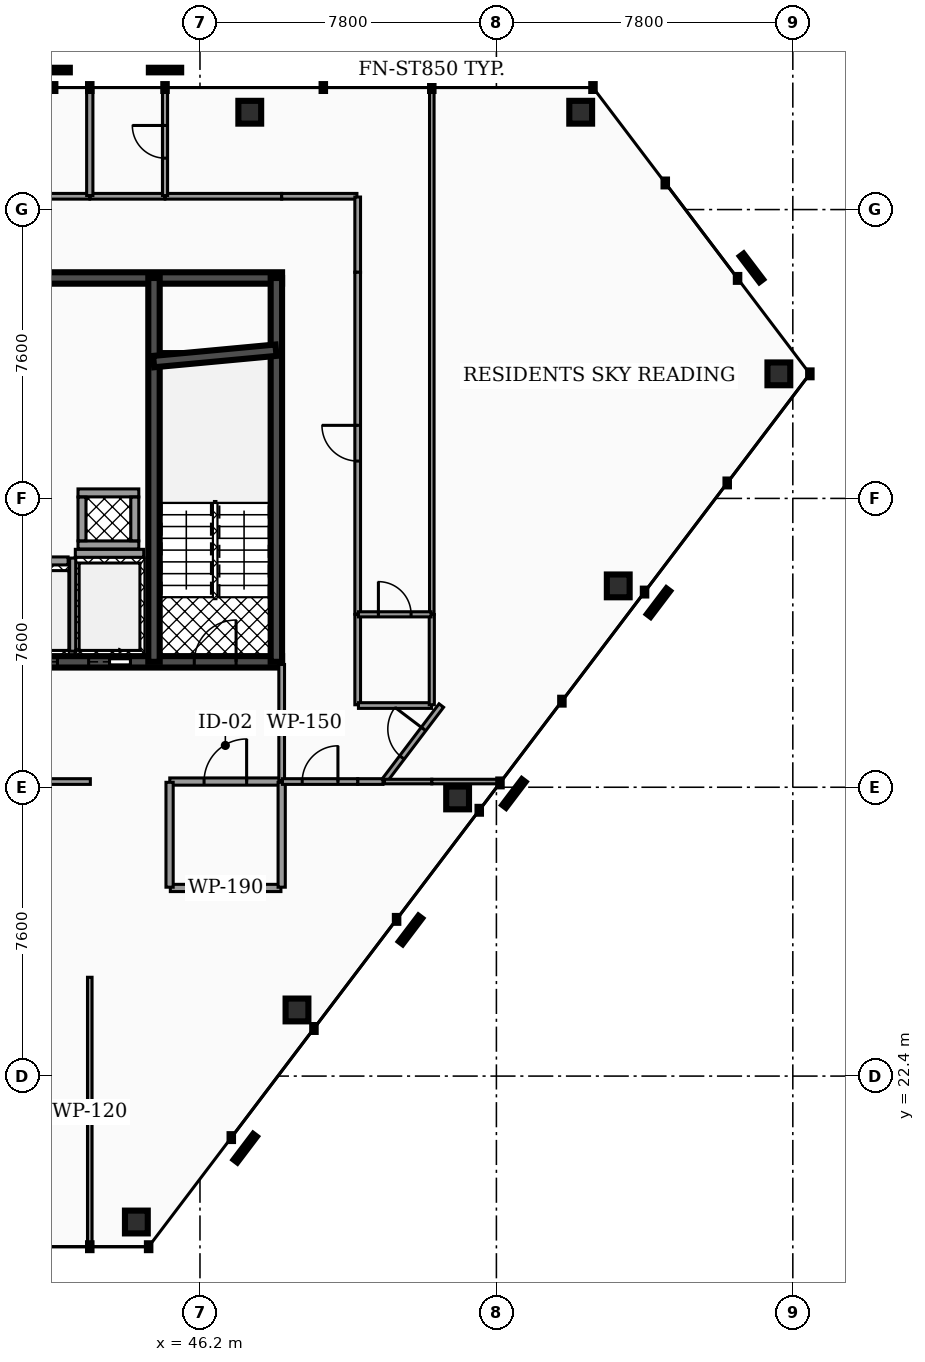
"""IFC4 building model, lengths in metres.
Left out: names, types, materials, properties, quantities, classifications, styles, units other than length and angle.
Written with IfcOpenShell. Run it as: python <this file> out.ifc"""

import sys

from ifc_helpers import new_model, si_unit, direction, frame, frame_2d, origin, origin_2d, place, context, subcontext, project, spatial, rectangle, hollow_rectangle, extrude, element, fill, save


model = new_model("IFC4")
c1 = context("Model", 3, precision=1e-05, world=origin(), true_north=direction((0.0, 1.0)))
c2 = subcontext(c1, "Body", "Model", "MODEL_VIEW")
j1 = project(units=[si_unit("LENGTHUNIT", "METRE"), si_unit("PLANEANGLEUNIT", "RADIAN")], contexts=[c1])
p1 = place(None, origin())
s1 = spatial("IfcSite", under=j1, at=p1, CompositionType="ELEMENT")
p2 = place(p1, origin())
s2 = spatial("IfcBuilding", under=s1, at=p2, CompositionType="ELEMENT")
p3 = place(p2, frame((0.0, 0.0, 208.76)))
s3 = spatial("IfcBuildingStorey", under=s2, at=p3, CompositionType="ELEMENT", Elevation=208.76)
p4 = place(p3, frame((28.5, 43.4, 0.0), z_axis=(0.0, 0.0, 1.0), x_axis=(1.0, 0.0, 0.0)))
e1 = element("IfcWall", 1, at=p4, inside=s3, PredefinedType="SHEAR", context=c2, shape_type="SweptSolid", body=[
    extrude(rectangle(XDim=19.86, YDim=0.3, at=frame_2d((9.93, 0.0))), origin(), (0.0, 0.0, 1.0), 3.18),
])
p5 = place(p3, frame((28.5, 33.3, 0.0), z_axis=(0.0, 0.0, 1.0), x_axis=(1.0, 0.0, 0.0)))
e2 = element("IfcWall", 2, at=p5, inside=s3, PredefinedType="SHEAR", context=c2, shape_type="SweptSolid", body=[
    extrude(rectangle(XDim=19.86, YDim=0.3, at=frame_2d((9.93, 0.0))), origin(), (0.0, 0.0, 1.0), 3.18),
])
p6 = place(p5, frame((3.93, 0.0, 0.0)))
e3 = element("IfcOpeningElement", 3, at=p6, cuts=e2, PredefinedType="OPENING", context=c2, shape_type="SweptSolid", body=[
    extrude(rectangle(XDim=1.1, YDim=2.15, at=frame_2d((0.55, 1.075))), frame((0.0, 0.16, 0.0), z_axis=(0.0, -1.0, 0.0), x_axis=(1.0, 0.0, 0.0)), (0.0, 0.0, 1.0), 0.32),
])
p7 = place(p5, frame((14.77, 0.0, 0.0)))
e4 = element("IfcOpeningElement", 4, at=p7, cuts=e2, PredefinedType="OPENING", context=c2, shape_type="SweptSolid", body=[
    extrude(rectangle(XDim=1.1, YDim=2.15, at=frame_2d((0.55, 1.075))), frame((0.0, 0.16, 0.0), z_axis=(0.0, -1.0, 0.0), x_axis=(1.0, 0.0, 0.0)), (0.0, 0.0, 1.0), 0.32),
])
p8 = place(p5, frame((11.25, 0.0, 0.0)))
e5 = element("IfcOpeningElement", 5, at=p8, cuts=e2, PredefinedType="OPENING", context=c2, shape_type="SweptSolid", body=[
    extrude(rectangle(XDim=1.0, YDim=2.1, at=frame_2d((0.5, 1.05))), frame((0.0, 0.16, 0.0), z_axis=(0.0, -1.0, 0.0), x_axis=(1.0, 0.0, 0.0)), (0.0, 0.0, 1.0), 0.32),
])
p9 = place(p5, frame((12.95, 0.0, 0.0)))
e6 = element("IfcOpeningElement", 6, at=p9, cuts=e2, PredefinedType="OPENING", context=c2, shape_type="SweptSolid", body=[
    extrude(rectangle(XDim=1.0, YDim=2.1, at=frame_2d((0.5, 1.05))), frame((0.0, 0.16, 0.0), z_axis=(0.0, -1.0, 0.0), x_axis=(1.0, 0.0, 0.0)), (0.0, 0.0, 1.0), 0.32),
])
p10 = place(p5, frame((5.85, 0.0, 0.0)))
e7 = element("IfcOpeningElement", 7, at=p10, cuts=e2, PredefinedType="OPENING", context=c2, shape_type="SweptSolid", body=[
    extrude(rectangle(XDim=1.0, YDim=2.1, at=frame_2d((0.5, 1.05))), frame((0.0, 0.16, 0.0), z_axis=(0.0, -1.0, 0.0), x_axis=(1.0, 0.0, 0.0)), (0.0, 0.0, 1.0), 0.32),
])
p11 = place(p5, frame((1.21, 0.0, 0.0)))
e8 = element("IfcOpeningElement", 8, at=p11, cuts=e2, PredefinedType="OPENING", context=c2, shape_type="SweptSolid", body=[
    extrude(rectangle(XDim=1.1, YDim=2.2, at=frame_2d((0.55, 1.1))), frame((0.0, 0.16, 0.0), z_axis=(0.0, -1.0, 0.0), x_axis=(1.0, 0.0, 0.0)), (0.0, 0.0, 1.0), 0.32),
])
p12 = place(p5, frame((9.34, 0.0, 0.0)))
e9 = element("IfcOpeningElement", 9, at=p12, cuts=e2, PredefinedType="OPENING", context=c2, shape_type="SweptSolid", body=[
    extrude(rectangle(XDim=1.12, YDim=2.05, at=frame_2d((0.56, 1.025))), frame((0.0, 0.16, 0.0), z_axis=(0.0, -1.0, 0.0), x_axis=(1.0, 0.0, 0.0)), (0.0, 0.0, 1.0), 0.32),
])
p13 = place(p5, frame((17.55, 0.0, 0.0)))
e10 = element("IfcOpeningElement", 10, at=p13, cuts=e2, PredefinedType="OPENING", context=c2, shape_type="SweptSolid", body=[
    extrude(rectangle(XDim=1.1, YDim=2.2, at=frame_2d((0.55, 1.1))), frame((0.0, 0.16, 0.0), z_axis=(0.0, -1.0, 0.0), x_axis=(1.0, 0.0, 0.0)), (0.0, 0.0, 1.0), 0.32),
])
for number, where, z_axis, x_axis in (
    (11, (44.99, 33.3, 0.0), (0.0, 0.0, 1.0), (0.0, 1.0, 0.0)),
    (12, (48.21, 33.3, 0.0), (0.0, 0.0, 1.0), (0.0, 1.0, 0.0)),
):
    element("IfcWall", number, at=place(p3, frame(where, z_axis=z_axis, x_axis=x_axis)), inside=s3, PredefinedType="SHEAR", context=c2, shape_type="SweptSolid", body=[
        extrude(rectangle(XDim=10.1, YDim=0.3, at=frame_2d((5.05, 0.0))), origin(), (0.0, 0.0, 1.0), 3.18),
    ])
p14 = place(p3, frame((44.98, 41.2, 0.0), z_axis=(0.0, 0.0, 1.0), x_axis=(0.995686468965, 0.09278176286, 0.0)))
e13 = element("IfcWall", 13, at=p14, inside=s3, PredefinedType="SHEAR", context=c2, shape_type="SweptSolid", body=[
    extrude(rectangle(XDim=3.234, YDim=0.3, at=frame_2d((1.617, 0.0))), origin(), (0.0, 0.0, 1.0), 3.18),
])
for number, where, z_axis, x_axis in (
    (14, (56.218, 47.761, 0.0), (0.0, 0.0, 1.0), (1.0, 0.0, 0.0)),
    (15, (47.51, 47.761, 0.0), (0.0, 0.0, 1.0), (1.0, 0.0, 0.0)),
    (16, (44.526, 18.561, 0.0), (0.0, 0.0, 1.0), (1.0, 0.0, 0.0)),
    (17, (48.753, 24.14, 0.0), (0.0, 0.0, 1.0), (1.0, 0.0, 0.0)),
    (18, (52.979, 29.719, 0.0), (0.0, 0.0, 1.0), (1.0, 0.0, 0.0)),
    (19, (57.206, 35.298, 0.0), (0.0, 0.0, 1.0), (1.0, 0.0, 0.0)),
    (20, (61.433, 40.878, 0.0), (0.0, 0.0, 1.0), (1.0, 0.0, 0.0)),
):
    element("IfcColumn", number, at=place(p3, frame(where, z_axis=z_axis, x_axis=x_axis)), inside=s3, PredefinedType="COLUMN", context=c2, shape_type="SweptSolid", body=[
        extrude(hollow_rectangle(XDim=0.6, YDim=0.6, WallThickness=0.03, at=origin_2d()), origin(), (0.0, 0.0, 1.0), 3.18),
    ])
p15 = place(p3, frame((42.92, 36.155, 0.0), z_axis=(0.0, 0.0, 1.0), x_axis=(1.0, 0.0, 0.0)))
e21 = element("IfcWall", 21, at=p15, inside=s3, PredefinedType="SOLIDWALL", context=c2, shape_type="SweptSolid", body=[
    extrude(rectangle(XDim=1.8, YDim=0.21, at=frame_2d((0.9, 0.0))), origin(), (0.0, 0.0, 1.0), 3.18),
])
p16 = place(p3, frame((42.85, 33.58, 0.0), z_axis=(0.0, 0.0, 1.0), x_axis=(0.0, 1.0, 0.0)))
e22 = element("IfcWall", 22, at=p16, inside=s3, PredefinedType="SOLIDWALL", context=c2, shape_type="SweptSolid", body=[
    extrude(rectangle(XDim=2.45, YDim=0.16, at=frame_2d((1.225, 0.0))), origin(), (0.0, 0.0, 1.0), 3.18),
])
p17 = place(p3, frame((41.17, 35.955, 0.0), z_axis=(0.0, 0.0, 1.0), x_axis=(1.0, 0.0, 0.0)))
e23 = element("IfcWall", 23, at=p17, inside=s3, PredefinedType="SOLIDWALL", context=c2, shape_type="SweptSolid", body=[
    extrude(rectangle(XDim=1.56, YDim=0.21, at=frame_2d((0.78, 0.0))), origin(), (0.0, 0.0, 1.0), 3.18),
])
for number, where, z_axis, x_axis in (
    (24, (42.99, 36.375, 0.0), (0.0, 0.0, 1.0), (1.0, 0.0, 0.0)),
    (25, (42.99, 37.745, 0.0), (0.0, 0.0, 1.0), (1.0, 0.0, 0.0)),
):
    element("IfcWall", number, at=place(p3, frame(where, z_axis=z_axis, x_axis=x_axis)), inside=s3, PredefinedType="SOLIDWALL", context=c2, shape_type="SweptSolid", body=[
        extrude(rectangle(XDim=1.6, YDim=0.21, at=frame_2d((0.8, 0.0))), origin(), (0.0, 0.0, 1.0), 3.18),
    ])
for number, where, z_axis, x_axis in (
    (26, (43.095, 36.485, 0.0), (0.0, 0.0, 1.0), (0.0, 1.0, 0.0)),
    (27, (44.485, 36.485, 0.0), (0.0, 0.0, 1.0), (0.0, 1.0, 0.0)),
):
    element("IfcWall", number, at=place(p3, frame(where, z_axis=z_axis, x_axis=x_axis)), inside=s3, PredefinedType="SOLIDWALL", context=c2, shape_type="SweptSolid", body=[
        extrude(rectangle(XDim=1.15, YDim=0.21, at=frame_2d((0.575, 0.0))), origin(), (0.0, 0.0, 1.0), 3.18),
    ])
p18 = place(p3, frame((45.405, 30.15, 0.0), z_axis=(0.0, 0.0, 1.0), x_axis=(1.0, 0.0, 0.0)))
e28 = element("IfcWall", 28, at=p18, inside=s3, PredefinedType="PARTITIONING", context=c2, shape_type="SweptSolid", body=[
    extrude(rectangle(XDim=2.925, YDim=0.19, at=frame_2d((1.462, 0.0))), origin(), (0.0, 0.0, 1.0), 2.235),
])
p19 = place(p18, frame((0.903, 0.0, 0.0)))
e29 = element("IfcOpeningElement", 29, at=p19, cuts=e28, PredefinedType="OPENING", context=c2, shape_type="SweptSolid", body=[
    extrude(rectangle(XDim=1.12, YDim=2.05, at=frame_2d((0.56, 1.025))), frame((0.0, 0.105, 0.0), z_axis=(0.0, -1.0, 0.0), x_axis=(1.0, 0.0, 0.0)), (0.0, 0.0, 1.0), 0.21),
])
p20 = place(p3, frame((48.35, 30.17, 0.0), z_axis=(0.0, 0.0, 1.0), x_axis=(0.0, 1.0, 0.0)))
e30 = element("IfcWall", 30, at=p20, inside=s3, PredefinedType="PARTITIONING", context=c2, shape_type="SweptSolid", body=[
    extrude(rectangle(XDim=3.06, YDim=0.15, at=frame_2d((1.53, 0.0))), origin(), (0.0, 0.0, 1.0), 2.235),
])
p21 = place(p3, frame((33.485, 30.15, 0.0), z_axis=(0.0, 0.0, 1.0), x_axis=(1.0, 0.0, 0.0)))
e31 = element("IfcWall", 31, at=p21, inside=s3, PredefinedType="PARTITIONING", context=c2, shape_type="SweptSolid", body=[
    extrude(rectangle(XDim=9.83, YDim=0.15, at=frame_2d((4.915, 0.0))), origin(), (0.0, 0.0, 1.0), 2.235),
])
p22 = place(p21, frame((0.445, 0.0, 0.0)))
e32 = element("IfcOpeningElement", 32, at=p22, cuts=e31, PredefinedType="OPENING", context=c2, shape_type="SweptSolid", body=[
    extrude(rectangle(XDim=0.94, YDim=2.05, at=frame_2d((0.47, 1.025))), frame((0.0, 0.085, 0.0), z_axis=(0.0, -1.0, 0.0), x_axis=(1.0, 0.0, 0.0)), (0.0, 0.0, 1.0), 0.17),
])
p23 = place(p3, frame((45.42, 27.35, 0.0), z_axis=(0.0, 0.0, 1.0), x_axis=(1.0, 0.0, 0.0)))
e33 = element("IfcWall", 33, at=p23, inside=s3, PredefinedType="PARTITIONING", context=c2, shape_type="SweptSolid", body=[
    extrude(rectangle(XDim=2.91, YDim=0.19, at=frame_2d((1.455, 0.0))), origin(), (0.0, 0.0, 1.0), 2.235),
])
for number, where, z_axis, x_axis in (
    (34, (45.4, 27.37, 0.0), (0.0, 0.0, 1.0), (0.0, 1.0, 0.0)),
    (35, (48.35, 27.37, 0.0), (0.0, 0.0, 1.0), (0.0, 1.0, 0.0)),
):
    element("IfcWall", number, at=place(p3, frame(where, z_axis=z_axis, x_axis=x_axis)), inside=s3, PredefinedType="PARTITIONING", context=c2, shape_type="SweptSolid", body=[
        extrude(rectangle(XDim=2.76, YDim=0.19, at=frame_2d((1.38, 0.0))), origin(), (0.0, 0.0, 1.0), 2.235),
    ])
p24 = place(p3, frame((50.35, 30.15, 0.0), z_axis=(0.0, 0.0, 1.0), x_axis=(1.0, 0.0, 0.0)))
e36 = element("IfcWall", 36, at=p24, inside=s3, PredefinedType="PARTITIONING", context=c2, shape_type="SweptSolid", body=[
    extrude(rectangle(XDim=0.665, YDim=0.15, at=frame_2d((0.333, 0.0))), origin(), (0.0, 0.0, 1.0), 2.235),
])
p25 = place(p3, frame((48.37, 30.15, 0.0), z_axis=(0.0, 0.0, 1.0), x_axis=(1.0, 0.0, 0.0)))
e37 = element("IfcWall", 37, at=p25, inside=s3, PredefinedType="PARTITIONING", context=c2, shape_type="SweptSolid", body=[
    extrude(rectangle(XDim=1.98, YDim=0.15, at=frame_2d((0.99, 0.0))), origin(), (0.0, 0.0, 1.0), 2.235),
])
p26 = place(p25, frame((0.52, 0.0, 0.0)))
e38 = element("IfcOpeningElement", 38, at=p26, cuts=e37, PredefinedType="OPENING", context=c2, shape_type="SweptSolid", body=[
    extrude(rectangle(XDim=0.94, YDim=2.05, at=frame_2d((0.47, 1.025))), frame((0.0, 0.085, 0.0), z_axis=(0.0, -1.0, 0.0), x_axis=(1.0, 0.0, 0.0)), (0.0, 0.0, 1.0), 0.17),
])
p27 = place(p3, frame((51.047, 30.166, 0.0), z_axis=(0.0, 0.0, 1.0), x_axis=(0.60385391082, 0.797095009637, 0.0)))
e39 = element("IfcWall", 39, at=p27, inside=s3, PredefinedType="PARTITIONING", context=c2, shape_type="SweptSolid", body=[
    extrude(rectangle(XDim=2.489, YDim=0.15, at=frame_2d((1.245, 0.0))), origin(), (0.0, 0.0, 1.0), 2.235),
])
p28 = place(p27, frame((0.775, 0.0, 0.0)))
e40 = element("IfcOpeningElement", 40, at=p28, cuts=e39, PredefinedType="OPENING", context=c2, shape_type="SweptSolid", body=[
    extrude(rectangle(XDim=0.94, YDim=2.05, at=frame_2d((0.47, 1.025))), frame((0.0, 0.085, 0.0), z_axis=(0.0, -1.0, 0.0), x_axis=(1.0, 0.0, 0.0)), (0.0, 0.0, 1.0), 0.17),
])
p29 = place(p3, frame((45.285, 45.55, 0.0), z_axis=(0.0, 0.0, 1.0), x_axis=(1.0, 0.0, 0.0)))
e41 = element("IfcWall", 41, at=p29, inside=s3, PredefinedType="PARTITIONING", context=c2, shape_type="SweptSolid", body=[
    extrude(rectangle(XDim=3.065, YDim=0.15, at=frame_2d((1.533, 0.0))), origin(), (0.0, 0.0, 1.0), 2.235),
])
for number, where, z_axis, x_axis in (
    (42, (48.35, 45.55, 0.0), (0.0, 0.0, 1.0), (1.0, 0.0, 0.0)),
    (43, (50.35, 43.55, 0.0), (0.0, 0.0, 1.0), (0.0, 1.0, 0.0)),
):
    element("IfcWall", number, at=place(p3, frame(where, z_axis=z_axis, x_axis=x_axis)), inside=s3, PredefinedType="PARTITIONING", context=c2, shape_type="SweptSolid", body=[
        extrude(rectangle(XDim=1.98, YDim=0.15, at=frame_2d((0.99, 0.0))), origin(), (0.0, 0.0, 1.0), 2.235),
    ])
p30 = place(p3, frame((50.35, 34.555, 0.0), z_axis=(0.0, 0.0, 1.0), x_axis=(0.0, 1.0, 0.0)))
e44 = element("IfcWall", 44, at=p30, inside=s3, PredefinedType="PARTITIONING", context=c2, shape_type="SweptSolid", body=[
    extrude(rectangle(XDim=8.995, YDim=0.15, at=frame_2d((4.498, 0.0))), origin(), (0.0, 0.0, 1.0), 2.235),
])
p31 = place(p30, frame((4.028, 0.0, 0.0)))
e45 = element("IfcOpeningElement", 45, at=p31, cuts=e44, PredefinedType="OPENING", context=c2, shape_type="SweptSolid", body=[
    extrude(rectangle(XDim=0.94, YDim=2.05, at=frame_2d((0.47, 1.025))), frame((0.0, 0.085, 0.0), z_axis=(0.0, -1.0, 0.0), x_axis=(1.0, 0.0, 0.0)), (0.0, 0.0, 1.0), 0.17),
])
p32 = place(p3, frame((43.305, 45.55, 0.0), z_axis=(0.0, 0.0, 1.0), x_axis=(1.0, 0.0, 0.0)))
e46 = element("IfcWall", 46, at=p32, inside=s3, PredefinedType="PARTITIONING", context=c2, shape_type="SweptSolid", body=[
    extrude(rectangle(XDim=1.97, YDim=0.15, at=frame_2d((0.985, 0.0))), origin(), (0.0, 0.0, 1.0), 2.235),
])
p33 = place(p3, frame((50.35, 32.17, 0.0), z_axis=(0.0, 0.0, 1.0), x_axis=(0.0, 1.0, 0.0)))
e47 = element("IfcWall", 47, at=p33, inside=s3, PredefinedType="PARTITIONING", context=c2, shape_type="SweptSolid", body=[
    extrude(rectangle(XDim=2.375, YDim=0.15, at=frame_2d((1.188, 0.0))), origin(), (0.0, 0.0, 1.0), 2.235),
])
p34 = place(p3, frame((50.37, 32.15, 0.0), z_axis=(0.0, 0.0, 1.0), x_axis=(1.0, 0.0, 0.0)))
e48 = element("IfcWall", 48, at=p34, inside=s3, PredefinedType="PARTITIONING", context=c2, shape_type="SweptSolid", body=[
    extrude(rectangle(XDim=1.925, YDim=0.15, at=frame_2d((0.962, 0.0))), origin(), (0.0, 0.0, 1.0), 2.235),
])
p35 = place(p3, frame((40.894, 45.55, 0.0), z_axis=(0.0, 0.0, 1.0), x_axis=(1.0, 0.0, 0.0)))
e49 = element("IfcWall", 49, at=p35, inside=s3, PredefinedType="PARTITIONING", context=c2, shape_type="SweptSolid", body=[
    extrude(rectangle(XDim=2.401, YDim=0.15, at=frame_2d((1.2, 0.0))), origin(), (0.0, 0.0, 1.0), 2.235),
])
p36 = place(p3, frame((43.3, 17.926, 0.0), z_axis=(0.0, 0.0, 1.0), x_axis=(0.0, 1.0, 0.0)))
e50 = element("IfcWall", 50, at=p36, inside=s3, PredefinedType="PARTITIONING", context=c2, shape_type="SweptSolid", body=[
    extrude(rectangle(XDim=7.074, YDim=0.12, at=frame_2d((3.537, 0.0))), origin(), (0.0, 0.0, 1.0), 2.235),
])
p37 = place(p3, frame((51.055, 30.15, 0.0), z_axis=(0.0, 0.0, 1.0), x_axis=(1.0, 0.0, 0.0)))
e51 = element("IfcWall", 51, at=p37, inside=s3, PredefinedType="PARTITIONING", context=c2, shape_type="SweptSolid", body=[
    extrude(rectangle(XDim=1.245, YDim=0.12, at=frame_2d((0.623, 0.0))), origin(), (0.0, 0.0, 1.0), 2.235),
])
p38 = place(p3, frame((52.3, 30.15, 0.0), z_axis=(0.0, 0.0, 1.0), x_axis=(1.0, 0.0, 0.0)))
e52 = element("IfcWall", 52, at=p38, inside=s3, PredefinedType="PARTITIONING", context=c2, shape_type="SweptSolid", body=[
    extrude(rectangle(XDim=1.806, YDim=0.12, at=frame_2d((0.903, 0.0))), origin(), (0.0, 0.0, 1.0), 2.235),
])
p39 = place(p3, frame((52.3, 34.555, 0.0), z_axis=(0.0, 0.0, 1.0), x_axis=(0.0, 1.0, 0.0)))
e53 = element("IfcWall", 53, at=p39, inside=s3, PredefinedType="PARTITIONING", context=c2, shape_type="SweptSolid", body=[
    extrude(rectangle(XDim=13.841, YDim=0.12, at=frame_2d((6.92, 0.0))), origin(), (0.0, 0.0, 1.0), 2.235),
])
p40 = place(p3, frame((52.3, 32.17, 0.0), z_axis=(0.0, 0.0, 1.0), x_axis=(0.0, 1.0, 0.0)))
e54 = element("IfcWall", 54, at=p40, inside=s3, PredefinedType="PARTITIONING", context=c2, shape_type="SweptSolid", body=[
    extrude(rectangle(XDim=2.375, YDim=0.135, at=frame_2d((1.188, 0.0))), origin(), (0.0, 0.0, 1.0), 2.235),
])
p41 = place(p3, frame((45.28, 45.57, 0.0), z_axis=(0.0, 0.0, 1.0), x_axis=(0.0, 1.0, 0.0)))
e55 = element("IfcWall", 55, at=p41, inside=s3, PredefinedType="PARTITIONING", context=c2, shape_type="SweptSolid", body=[
    extrude(rectangle(XDim=2.826, YDim=0.135, at=frame_2d((1.413, 0.0))), origin(), (0.0, 0.0, 1.0), 2.235),
])
p42 = place(p41, frame((0.983, 0.0, 0.0)))
e56 = element("IfcOpeningElement", 56, at=p42, cuts=e55, PredefinedType="OPENING", context=c2, shape_type="SweptSolid", body=[
    extrude(rectangle(XDim=0.86, YDim=2.05, at=frame_2d((0.43, 1.025))), frame((0.0, 0.077, 0.0), z_axis=(0.0, -1.0, 0.0), x_axis=(1.0, 0.0, 0.0)), (0.0, 0.0, 1.0), 0.155),
])
p43 = place(p3, frame((50.37, 34.55, 0.0), z_axis=(0.0, 0.0, 1.0), x_axis=(1.0, 0.0, 0.0)))
e57 = element("IfcWall", 57, at=p43, inside=s3, PredefinedType="PARTITIONING", context=c2, shape_type="SweptSolid", body=[
    extrude(rectangle(XDim=1.91, YDim=0.135, at=frame_2d((0.955, 0.0))), origin(), (0.0, 0.0, 1.0), 2.235),
])
p44 = place(p43, frame((0.525, 0.0, 0.0)))
e58 = element("IfcOpeningElement", 58, at=p44, cuts=e57, PredefinedType="OPENING", context=c2, shape_type="SweptSolid", body=[
    extrude(rectangle(XDim=0.86, YDim=2.05, at=frame_2d((0.43, 1.025))), frame((0.0, 0.077, 0.0), z_axis=(0.0, -1.0, 0.0), x_axis=(1.0, 0.0, 0.0)), (0.0, 0.0, 1.0), 0.155),
])
p45 = place(p3, frame((43.3, 45.57, 0.0), z_axis=(0.0, 0.0, 1.0), x_axis=(0.0, 1.0, 0.0)))
e59 = element("IfcWall", 59, at=p45, inside=s3, PredefinedType="PARTITIONING", context=c2, shape_type="SweptSolid", body=[
    extrude(rectangle(XDim=2.826, YDim=0.165, at=frame_2d((1.413, 0.0))), origin(), (0.0, 0.0, 1.0), 2.235),
])
p46 = place(p7, origin())
e60 = element("IfcDoor", 60, at=p46, inside=s3, OperationType="SLIDING_TO_RIGHT", PredefinedType="DOOR", context=c2, shape_type="SweptSolid", body=[
    extrude(rectangle(XDim=1.1, YDim=2.15, at=frame_2d((0.55, 1.075))), frame((0.0, 0.025, 0.0), z_axis=(0.0, -1.0, 0.0), x_axis=(1.0, 0.0, 0.0)), (0.0, 0.0, 1.0), 0.05),
])
fill(e4, e60)
p47 = place(p9, origin())
e61 = element("IfcDoor", 61, at=p47, inside=s3, OperationType="SLIDING_TO_LEFT", PredefinedType="DOOR", context=c2, shape_type="SweptSolid", body=[
    extrude(rectangle(XDim=1.0, YDim=2.1, at=frame_2d((0.5, 1.05))), frame((0.0, 0.025, 0.0), z_axis=(0.0, -1.0, 0.0), x_axis=(1.0, 0.0, 0.0)), (0.0, 0.0, 1.0), 0.05),
])
fill(e6, e61)
p48 = place(p13, origin())
e62 = element("IfcDoor", 62, at=p48, inside=s3, OperationType="SINGLE_SWING_RIGHT", PredefinedType="DOOR", context=c2, shape_type="SweptSolid", body=[
    extrude(rectangle(XDim=1.1, YDim=2.2, at=frame_2d((0.55, 1.1))), frame((0.0, 0.025, 0.0), z_axis=(0.0, -1.0, 0.0), x_axis=(1.0, 0.0, 0.0)), (0.0, 0.0, 1.0), 0.05),
])
fill(e10, e62)
p49 = place(p19, origin())
e63 = element("IfcDoor", 63, at=p49, inside=s3, OperationType="SINGLE_SWING_RIGHT", PredefinedType="DOOR", context=c2, shape_type="SweptSolid", body=[
    extrude(rectangle(XDim=1.12, YDim=2.05, at=frame_2d((0.56, 1.025))), frame((0.0, 0.025, 0.0), z_axis=(0.0, -1.0, 0.0), x_axis=(1.0, 0.0, 0.0)), (0.0, 0.0, 1.0), 0.05),
])
fill(e29, e63)
p50 = place(p26, origin())
e64 = element("IfcDoor", 64, at=p50, inside=s3, OperationType="SINGLE_SWING_RIGHT", PredefinedType="DOOR", context=c2, shape_type="SweptSolid", body=[
    extrude(rectangle(XDim=0.94, YDim=2.05, at=frame_2d((0.47, 1.025))), frame((0.0, 0.025, 0.0), z_axis=(0.0, -1.0, 0.0), x_axis=(1.0, 0.0, 0.0)), (0.0, 0.0, 1.0), 0.05),
])
fill(e38, e64)
p51 = place(p28, origin())
e65 = element("IfcDoor", 65, at=p51, inside=s3, OperationType="SINGLE_SWING_RIGHT", PredefinedType="DOOR", context=c2, shape_type="SweptSolid", body=[
    extrude(rectangle(XDim=0.94, YDim=2.05, at=frame_2d((0.47, 1.025))), frame((0.0, 0.025, 0.0), z_axis=(0.0, -1.0, 0.0), x_axis=(1.0, 0.0, 0.0)), (0.0, 0.0, 1.0), 0.05),
])
fill(e40, e65)
p52 = place(p31, origin())
e66 = element("IfcDoor", 66, at=p52, inside=s3, OperationType="SINGLE_SWING_RIGHT", PredefinedType="DOOR", context=c2, shape_type="SweptSolid", body=[
    extrude(rectangle(XDim=0.94, YDim=2.05, at=frame_2d((0.47, 1.025))), frame((0.0, 0.025, 0.0), z_axis=(0.0, -1.0, 0.0), x_axis=(1.0, 0.0, 0.0)), (0.0, 0.0, 1.0), 0.05),
])
fill(e45, e66)
p53 = place(p42, origin())
e67 = element("IfcDoor", 67, at=p53, inside=s3, OperationType="SINGLE_SWING_RIGHT", PredefinedType="DOOR", context=c2, shape_type="SweptSolid", body=[
    extrude(rectangle(XDim=0.86, YDim=2.05, at=frame_2d((0.43, 1.025))), frame((0.0, 0.025, 0.0), z_axis=(0.0, -1.0, 0.0), x_axis=(1.0, 0.0, 0.0)), (0.0, 0.0, 1.0), 0.05),
])
fill(e56, e67)
p54 = place(p44, origin())
e68 = element("IfcDoor", 68, at=p54, inside=s3, OperationType="SINGLE_SWING_LEFT", PredefinedType="DOOR", context=c2, shape_type="SweptSolid", body=[
    extrude(rectangle(XDim=0.86, YDim=2.05, at=frame_2d((0.43, 1.025))), frame((0.0, 0.025, 0.0), z_axis=(0.0, -1.0, 0.0), x_axis=(1.0, 0.0, 0.0)), (0.0, 0.0, 1.0), 0.05),
])
fill(e58, e68)
save(model, sys.argv[1])
